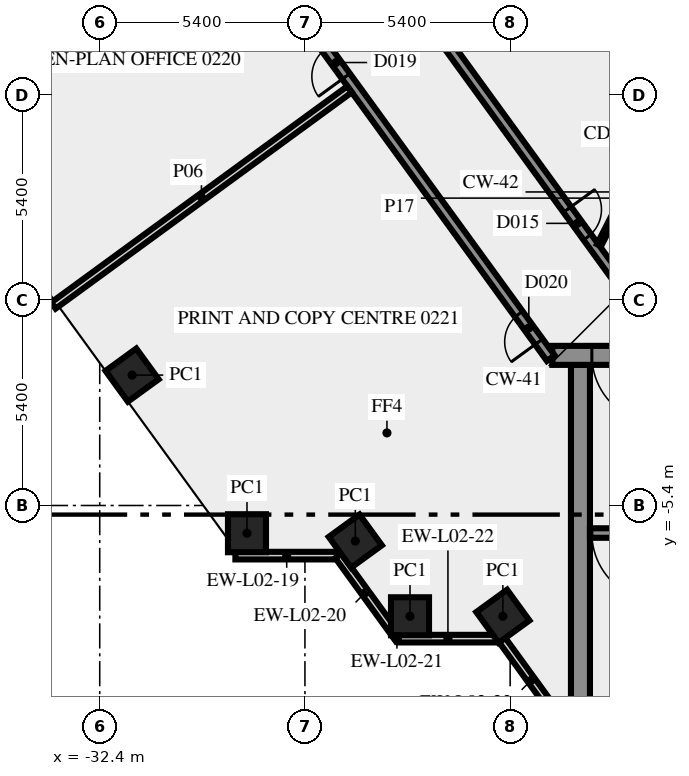
"""IFC4 building model, lengths in metres.
Left out: names, types, materials, properties, quantities, classifications, styles, units other than length and angle.
Written with IfcOpenShell. Run it as: python <this file> out.ifc"""

import sys

from ifc_helpers import new_model, si_unit, direction, frame, frame_2d, origin, origin_2d, place, context, subcontext, project, spatial, rectangle, extrude, element, fill, save


model = new_model("IFC4")
c1 = context("Model", 3, precision=1e-05, world=origin(), true_north=direction((0.0, 1.0)))
c2 = subcontext(c1, "Body", "Model", "MODEL_VIEW")
j1 = project(units=[si_unit("LENGTHUNIT", "METRE"), si_unit("PLANEANGLEUNIT", "RADIAN")], contexts=[c1])
p1 = place(None, origin())
s1 = spatial("IfcSite", under=j1, at=p1, CompositionType="ELEMENT")
p2 = place(p1, origin())
s2 = spatial("IfcBuilding", under=s1, at=p2, CompositionType="ELEMENT")
p3 = place(p2, frame((0.0, 0.0, 11.5)))
s3 = spatial("IfcBuildingStorey", under=s2, at=p3, CompositionType="ELEMENT", Elevation=11.5)
for number, where, z_axis, x_axis in (
    (1, (-31.548, -1.969, 0.0), (0.0, 0.0, 1.0), (0.588, -0.809, 0.0)),
    (2, (-28.525, -6.13, 0.0), (0.0, 0.0, 1.0), (1.0, 0.0, 0.0)),
    (3, (-25.674, -6.337, 0.0), (0.0, 0.0, 1.0), (0.588, -0.809, 0.0)),
    (4, (-24.235, -8.315, 0.0), (0.0, 0.0, 1.0), (1.0, 0.0, 0.0)),
    (5, (-21.792, -8.315, 0.0), (0.0, 0.0, 1.0), (0.588, -0.809, 0.0)),
):
    element("IfcColumn", number, at=place(p3, frame(where, z_axis=z_axis, x_axis=x_axis)), inside=s3, PredefinedType="COLUMN", context=c2, shape_type="SweptSolid", body=[
        extrude(rectangle(XDim=1.0, YDim=1.0, at=origin_2d()), origin(), (0.0, 0.0, 1.0), 4.1),
    ])
p4 = place(p3, frame((-28.83, -6.719, 0.0), z_axis=(0.0, 0.0, 1.0), x_axis=(1.0, 0.0, 0.0)))
e6 = element("IfcWall", 6, at=p4, inside=s3, PredefinedType="SOLIDWALL", context=c2, shape_type="SweptSolid", body=[
    extrude(rectangle(XDim=2.7, YDim=0.2, at=frame_2d((1.35, 0.0))), origin(), (0.0, 0.0, 1.0), 4.1),
])
p5 = place(p3, frame((-26.12, -6.724, 0.0), z_axis=(0.0, 0.0, 1.0), x_axis=(0.587706476352, -0.809074222587, 0.0)))
e7 = element("IfcWall", 7, at=p5, inside=s3, PredefinedType="SOLIDWALL", context=c2, shape_type="SweptSolid", body=[
    extrude(rectangle(XDim=2.403, YDim=0.2, at=frame_2d((1.202, 0.0))), origin(), (0.0, 0.0, 1.0), 4.1),
])
p6 = place(p3, frame((-24.624, -8.784, 0.0), z_axis=(0.0, 0.0, 1.0), x_axis=(0.586760218966, -0.809760733451, 0.0)))
e8 = element("IfcWall", 8, at=p6, inside=s3, PredefinedType="SOLIDWALL", context=c2, shape_type="SweptSolid", body=[
    extrude(rectangle(XDim=0.154, YDim=0.2, at=frame_2d((0.077, 0.0))), origin(), (0.0, 0.0, 1.0), 4.1),
])
p7 = place(p3, frame((-24.531, -8.904, 0.0), z_axis=(0.0, 0.0, 1.0), x_axis=(1.0, 0.0, 0.0)))
e9 = element("IfcWall", 9, at=p7, inside=s3, PredefinedType="SOLIDWALL", context=c2, shape_type="SweptSolid", body=[
    extrude(rectangle(XDim=2.587, YDim=0.2, at=frame_2d((1.294, 0.0))), origin(), (0.0, 0.0, 1.0), 4.1),
])
p8 = place(p3, frame((-21.833, -8.909, 0.0), z_axis=(0.0, 0.0, 1.0), x_axis=(0.587766567315, -0.809030569476, 0.0)))
e10 = element("IfcWall", 10, at=p8, inside=s3, PredefinedType="SOLIDWALL", context=c2, shape_type="SweptSolid", body=[
    extrude(rectangle(XDim=2.688, YDim=0.2, at=frame_2d((1.344, 0.0))), origin(), (0.0, 0.0, 1.0), 4.1),
])
p9 = place(p3, frame((-19.75, -10.5, 0.0), z_axis=(0.0, 0.0, 1.0), x_axis=(0.0, 1.0, 0.0)))
e11 = element("IfcWall", 11, at=p9, inside=s3, PredefinedType="SHEAR", context=c2, shape_type="SweptSolid", body=[
    extrude(rectangle(XDim=8.8, YDim=0.5, at=frame_2d((4.4, 0.0))), origin(), (0.0, 0.0, 1.0), 4.1),
])
p10 = place(p3, frame((-11.45, -6.125, 0.0), z_axis=(0.0, 0.0, 1.0), x_axis=(-1.0, 0.0, 0.0)))
e12 = element("IfcWall", 12, at=p10, inside=s3, PredefinedType="SHEAR", context=c2, shape_type="SweptSolid", body=[
    extrude(rectangle(XDim=8.05, YDim=0.25, at=frame_2d((4.025, 0.0))), origin(), (0.0, 0.0, 1.0), 4.1),
])
p11 = place(p10, frame((6.2, 0.0, 0.0)))
e13 = element("IfcOpeningElement", 13, at=p11, cuts=e12, PredefinedType="OPENING", context=c2, shape_type="SweptSolid", body=[
    extrude(rectangle(XDim=1.8, YDim=2.1, at=frame_2d((0.9, 1.05))), frame((0.0, 0.135, 0.0), z_axis=(0.0, -1.0, 0.0), x_axis=(1.0, 0.0, 0.0)), (0.0, 0.0, 1.0), 0.27),
])
p12 = place(p3, frame((20.49, -1.45, 0.0), z_axis=(0.0, 0.0, 1.0), x_axis=(-1.0, 0.0, 0.0)))
e14 = element("IfcWall", 14, at=p12, inside=s3, PredefinedType="SHEAR", context=c2, shape_type="SweptSolid", body=[
    extrude(rectangle(XDim=40.98, YDim=0.5, at=frame_2d((20.49, 0.0))), origin(), (0.0, 0.0, 1.0), 4.1),
])
p13 = place(p12, frame((38.14, 0.0, 0.0)))
e15 = element("IfcOpeningElement", 15, at=p13, cuts=e14, PredefinedType="OPENING", context=c2, shape_type="SweptSolid", body=[
    extrude(rectangle(XDim=1.8, YDim=2.1, at=frame_2d((0.9, 1.05))), frame((0.0, 0.26, 0.0), z_axis=(0.0, -1.0, 0.0), x_axis=(1.0, 0.0, 0.0)), (0.0, 0.0, 1.0), 0.52),
])
p14 = place(p12, frame((36.728, 0.0, 0.0)))
e16 = element("IfcOpeningElement", 16, at=p14, cuts=e14, PredefinedType="OPENING", context=c2, shape_type="SweptSolid", body=[
    extrude(rectangle(XDim=0.8, YDim=2.1, at=frame_2d((0.4, 1.05))), frame((0.0, 0.26, 0.0), z_axis=(0.0, -1.0, 0.0), x_axis=(1.0, 0.0, 0.0)), (0.0, 0.0, 1.0), 0.52),
])
p15 = place(p12, frame((35.153, 0.0, 0.0)))
e17 = element("IfcOpeningElement", 17, at=p15, cuts=e14, PredefinedType="OPENING", context=c2, shape_type="SweptSolid", body=[
    extrude(rectangle(XDim=0.8, YDim=2.1, at=frame_2d((0.4, 1.05))), frame((0.0, 0.26, 0.0), z_axis=(0.0, -1.0, 0.0), x_axis=(1.0, 0.0, 0.0)), (0.0, 0.0, 1.0), 0.52),
])
p16 = place(p12, frame((32.94, 0.0, 0.0)))
e18 = element("IfcOpeningElement", 18, at=p16, cuts=e14, PredefinedType="OPENING", context=c2, shape_type="SweptSolid", body=[
    extrude(rectangle(XDim=0.9, YDim=2.1, at=frame_2d((0.45, 1.05))), frame((0.0, 0.26, 0.0), z_axis=(0.0, -1.0, 0.0), x_axis=(1.0, 0.0, 0.0)), (0.0, 0.0, 1.0), 0.52),
])
p17 = place(p12, frame((21.765, 0.0, 0.0)))
e19 = element("IfcOpeningElement", 19, at=p17, cuts=e14, PredefinedType="OPENING", context=c2, shape_type="SweptSolid", body=[
    extrude(rectangle(XDim=2.0, YDim=2.1, at=frame_2d((1.0, 1.05))), frame((0.0, 0.26, 0.0), z_axis=(0.0, -1.0, 0.0), x_axis=(1.0, 0.0, 0.0)), (0.0, 0.0, 1.0), 0.52),
])
p18 = place(p12, frame((7.14, 0.0, 0.0)))
e20 = element("IfcOpeningElement", 20, at=p18, cuts=e14, PredefinedType="OPENING", context=c2, shape_type="SweptSolid", body=[
    extrude(rectangle(XDim=0.9, YDim=2.1, at=frame_2d((0.45, 1.05))), frame((0.0, 0.26, 0.0), z_axis=(0.0, -1.0, 0.0), x_axis=(1.0, 0.0, 0.0)), (0.0, 0.0, 1.0), 0.52),
])
p19 = place(p12, frame((4.19, 0.0, 0.0)))
e21 = element("IfcOpeningElement", 21, at=p19, cuts=e14, PredefinedType="OPENING", context=c2, shape_type="SweptSolid", body=[
    extrude(rectangle(XDim=0.9, YDim=2.1, at=frame_2d((0.45, 1.05))), frame((0.0, 0.26, 0.0), z_axis=(0.0, -1.0, 0.0), x_axis=(1.0, 0.0, 0.0)), (0.0, 0.0, 1.0), 0.52),
])
p20 = place(p12, frame((1.04, 0.0, 0.0)))
e22 = element("IfcOpeningElement", 22, at=p20, cuts=e14, PredefinedType="OPENING", context=c2, shape_type="SweptSolid", body=[
    extrude(rectangle(XDim=1.8, YDim=2.1, at=frame_2d((0.9, 1.05))), frame((0.0, 0.26, 0.0), z_axis=(0.0, -1.0, 0.0), x_axis=(1.0, 0.0, 0.0)), (0.0, 0.0, 1.0), 0.52),
])
p21 = place(p3, frame((-20.531, -1.523, 0.0), z_axis=(0.0, 0.0, 1.0), x_axis=(-0.587784522481, 0.809017524614, 0.0)))
e23 = element("IfcWall", 23, at=p21, inside=s3, PredefinedType="SOLIDWALL", context=c2, shape_type="SweptSolid", body=[
    extrude(rectangle(XDim=49.912, YDim=0.25, at=frame_2d((24.956, 0.0))), origin(), (0.0, 0.0, 1.0), 4.1),
])
p22 = place(p21, frame((48.57, 0.0, 0.0)))
e24 = element("IfcOpeningElement", 24, at=p22, cuts=e23, PredefinedType="OPENING", context=c2, shape_type="SweptSolid", body=[
    extrude(rectangle(XDim=0.9, YDim=2.1, at=frame_2d((0.45, 1.05))), frame((0.0, 0.135, 0.0), z_axis=(0.0, -1.0, 0.0), x_axis=(1.0, 0.0, 0.0)), (0.0, 0.0, 1.0), 0.27),
])
p23 = place(p21, frame((9.165, 0.0, 0.0)))
e25 = element("IfcOpeningElement", 25, at=p23, cuts=e23, PredefinedType="OPENING", context=c2, shape_type="SweptSolid", body=[
    extrude(rectangle(XDim=0.9, YDim=2.1, at=frame_2d((0.45, 1.05))), frame((0.0, 0.135, 0.0), z_axis=(0.0, -1.0, 0.0), x_axis=(1.0, 0.0, 0.0)), (0.0, 0.0, 1.0), 0.27),
])
p24 = place(p21, frame((21.416, 0.0, 0.0)))
e26 = element("IfcOpeningElement", 26, at=p24, cuts=e23, PredefinedType="OPENING", context=c2, shape_type="SweptSolid", body=[
    extrude(rectangle(XDim=1.8, YDim=2.1, at=frame_2d((0.9, 1.05))), frame((0.0, 0.135, 0.0), z_axis=(0.0, -1.0, 0.0), x_axis=(1.0, 0.0, 0.0)), (0.0, 0.0, 1.0), 0.27),
])
p25 = place(p21, frame((28.066, 0.0, 0.0)))
e27 = element("IfcOpeningElement", 27, at=p25, cuts=e23, PredefinedType="OPENING", context=c2, shape_type="SweptSolid", body=[
    extrude(rectangle(XDim=0.9, YDim=2.1, at=frame_2d((0.45, 1.05))), frame((0.0, 0.135, 0.0), z_axis=(0.0, -1.0, 0.0), x_axis=(1.0, 0.0, 0.0)), (0.0, 0.0, 1.0), 0.27),
])
p26 = place(p21, frame((0.533, 0.0, 0.0)))
e28 = element("IfcOpeningElement", 28, at=p26, cuts=e23, PredefinedType="OPENING", context=c2, shape_type="SweptSolid", body=[
    extrude(rectangle(XDim=0.9, YDim=2.1, at=frame_2d((0.45, 1.05))), frame((0.0, 0.135, 0.0), z_axis=(0.0, -1.0, 0.0), x_axis=(1.0, 0.0, 0.0)), (0.0, 0.0, 1.0), 0.27),
])
p27 = place(p3, frame((-37.232, 25.972, 0.0), z_axis=(0.0, 0.0, 1.0), x_axis=(0.587786323093, -0.809016216391, 0.0)))
e29 = element("IfcWall", 29, at=p27, inside=s3, PredefinedType="SOLIDWALL", context=c2, shape_type="SweptSolid", body=[
    extrude(rectangle(XDim=33.493, YDim=0.25, at=frame_2d((16.747, 0.0))), origin(), (0.0, 0.0, 1.0), 4.1),
])
p28 = place(p27, frame((4.438, 0.0, 0.0)))
e30 = element("IfcOpeningElement", 30, at=p28, cuts=e29, PredefinedType="OPENING", context=c2, shape_type="SweptSolid", body=[
    extrude(rectangle(XDim=1.8, YDim=2.1, at=frame_2d((0.9, 1.05))), frame((0.0, 0.135, 0.0), z_axis=(0.0, -1.0, 0.0), x_axis=(1.0, 0.0, 0.0)), (0.0, 0.0, 1.0), 0.27),
])
p29 = place(p27, frame((29.152, 0.0, 0.0)))
e31 = element("IfcOpeningElement", 31, at=p29, cuts=e29, PredefinedType="OPENING", context=c2, shape_type="SweptSolid", body=[
    extrude(rectangle(XDim=0.9, YDim=2.1, at=frame_2d((0.45, 1.05))), frame((0.0, 0.135, 0.0), z_axis=(0.0, -1.0, 0.0), x_axis=(1.0, 0.0, 0.0)), (0.0, 0.0, 1.0), 0.27),
])
p30 = place(p27, frame((14.835, 0.0, 0.0)))
e32 = element("IfcOpeningElement", 32, at=p30, cuts=e29, PredefinedType="OPENING", context=c2, shape_type="SweptSolid", body=[
    extrude(rectangle(XDim=0.9, YDim=2.1, at=frame_2d((0.45, 1.05))), frame((0.0, 0.135, 0.0), z_axis=(0.0, -1.0, 0.0), x_axis=(1.0, 0.0, 0.0)), (0.0, 0.0, 1.0), 0.27),
])
p31 = place(p3, frame((-33.62, -0.14, 0.0), z_axis=(0.0, 0.0, 1.0), x_axis=(0.80760566617, 0.589722890831, 0.0)))
e33 = element("IfcWall", 33, at=p31, inside=s3, PredefinedType="SOLIDWALL", context=c2, shape_type="SweptSolid", body=[
    extrude(rectangle(XDim=9.651, YDim=0.2, at=frame_2d((4.825, 0.0))), origin(), (0.0, 0.0, 1.0), 3.1),
])
p32 = place(p3, frame((-19.261, 1.45, 0.0), z_axis=(0.0, 0.0, 1.0), x_axis=(0.453950796792, 0.891026752736, 0.0)))
e34 = element("IfcWall", 34, at=p32, inside=s3, PredefinedType="PARTITIONING", context=c2, shape_type="SweptSolid", body=[
    extrude(rectangle(XDim=2.778, YDim=0.12, at=frame_2d((1.389, 0.0))), origin(), (0.0, 0.0, 1.0), 4.1),
])
p33 = place(p11, origin())
e35 = element("IfcDoor", 35, at=p33, inside=s3, OperationType="DOUBLE_DOOR_SINGLE_SWING", PredefinedType="DOOR", context=c2, shape_type="SweptSolid", body=[
    extrude(rectangle(XDim=1.8, YDim=2.1, at=frame_2d((0.9, 1.05))), frame((0.0, 0.025, 0.0), z_axis=(0.0, -1.0, 0.0), x_axis=(1.0, 0.0, 0.0)), (0.0, 0.0, 1.0), 0.05),
])
fill(e13, e35)
p34 = place(p13, origin())
e36 = element("IfcDoor", 36, at=p34, inside=s3, OperationType="DOUBLE_DOOR_SINGLE_SWING", PredefinedType="DOOR", context=c2, shape_type="SweptSolid", body=[
    extrude(rectangle(XDim=1.8, YDim=2.1, at=frame_2d((0.9, 1.05))), frame((0.0, 0.025, 0.0), z_axis=(0.0, -1.0, 0.0), x_axis=(1.0, 0.0, 0.0)), (0.0, 0.0, 1.0), 0.05),
])
fill(e15, e36)
p35 = place(p23, origin())
e37 = element("IfcDoor", 37, at=p35, inside=s3, OperationType="SINGLE_SWING_LEFT", PredefinedType="DOOR", context=c2, shape_type="SweptSolid", body=[
    extrude(rectangle(XDim=0.9, YDim=2.1, at=frame_2d((0.45, 1.05))), frame((0.0, 0.025, 0.0), z_axis=(0.0, -1.0, 0.0), x_axis=(1.0, 0.0, 0.0)), (0.0, 0.0, 1.0), 0.05),
])
fill(e25, e37)
p36 = place(p29, origin())
e38 = element("IfcDoor", 38, at=p36, inside=s3, OperationType="SINGLE_SWING_RIGHT", PredefinedType="DOOR", context=c2, shape_type="SweptSolid", body=[
    extrude(rectangle(XDim=0.9, YDim=2.1, at=frame_2d((0.45, 1.05))), frame((0.0, 0.025, 0.0), z_axis=(0.0, -1.0, 0.0), x_axis=(1.0, 0.0, 0.0)), (0.0, 0.0, 1.0), 0.05),
])
fill(e31, e38)
p37 = place(p26, origin())
e39 = element("IfcDoor", 39, at=p37, inside=s3, OperationType="SINGLE_SWING_LEFT", PredefinedType="DOOR", context=c2, shape_type="SweptSolid", body=[
    extrude(rectangle(XDim=0.9, YDim=2.1, at=frame_2d((0.45, 1.05))), frame((0.0, 0.025, 0.0), z_axis=(0.0, -1.0, 0.0), x_axis=(1.0, 0.0, 0.0)), (0.0, 0.0, 1.0), 0.05),
])
fill(e28, e39)
save(model, sys.argv[1])
